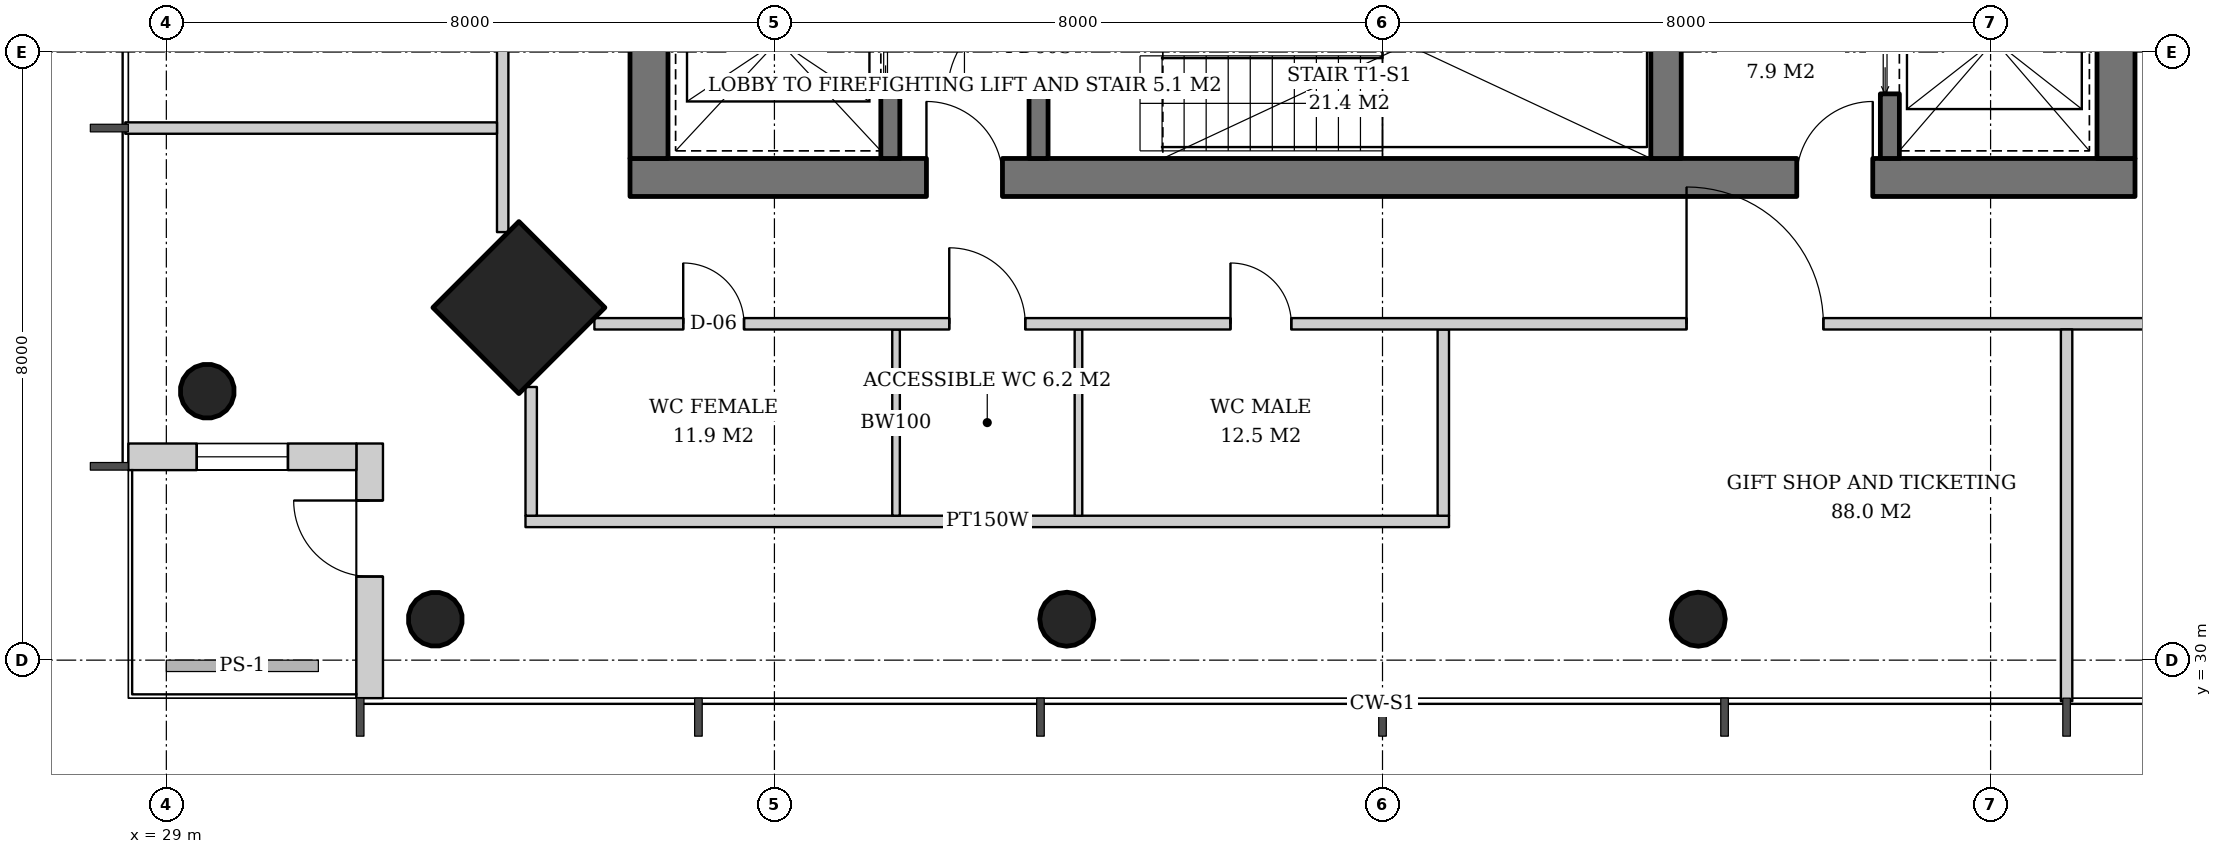
"""IFC4 building model, lengths in metres.
Left out: names, types, materials, properties, quantities, classifications, styles, units other than length and angle.
Written with IfcOpenShell. Run it as: python <this file> out.ifc"""

import sys

from ifc_helpers import new_model, si_unit, direction, frame, frame_2d, origin, origin_2d, place, context, subcontext, project, spatial, rectangle, hollow_circle, extrude, element, fill, save


model = new_model("IFC4")
c1 = context("Model", 3, precision=1e-05, world=origin(), true_north=direction((0.0, 1.0)))
c2 = subcontext(c1, "Body", "Model", "MODEL_VIEW")
j1 = project(units=[si_unit("LENGTHUNIT", "METRE"), si_unit("PLANEANGLEUNIT", "RADIAN")], contexts=[c1])
p1 = place(None, origin())
s1 = spatial("IfcSite", under=j1, at=p1, CompositionType="ELEMENT")
p2 = place(p1, origin())
s2 = spatial("IfcBuilding", under=s1, at=p2, CompositionType="ELEMENT")
p3 = place(p2, frame((0.0, 0.0, 287.0)))
s3 = spatial("IfcBuildingStorey", under=s2, at=p3, CompositionType="ELEMENT", Elevation=287.0)
p4 = place(p3, frame((33.6, 34.6, 0.0), z_axis=(0.031898107953, 0.031898107953, 0.998981992539), x_axis=(-0.707106781187, 0.707106781187, 0.0)))
e1 = element("IfcColumn", 1, at=p4, inside=s3, PredefinedType="COLUMN", context=c2, shape_type="SweptSolid", body=[
    extrude(rectangle(XDim=1.6, YDim=1.6, at=origin_2d()), origin(), (0.0, 0.0, 1.0), 3.804),
])
for number, where, z_axis, x_axis in (
    (2, (29.5, 33.5, 0.0), (0.032, 0.032, 0.999), (-0.707, 0.707, 0.0)),
    (3, (32.5, 30.5, 0.0), (0.032, 0.032, 0.999), (-0.707, 0.707, 0.0)),
):
    element("IfcColumn", number, at=place(p3, frame(where, z_axis=z_axis, x_axis=x_axis)), inside=s3, PredefinedType="COLUMN", context=c2, shape_type="SweptSolid", body=[
        extrude(hollow_circle(Radius=0.355, WallThickness=0.025, at=origin_2d()), origin(), (0.0, 0.0, 1.0), 3.804),
    ])
for number, where, z_axis, x_axis in (
    (4, (40.833, 30.5, 0.0), (0.011, 0.032, 0.999), (-0.948, 0.317, 0.0)),
    (5, (49.167, 30.5, 0.0), (-0.011, 0.032, 0.999), (-0.948, -0.317, 0.0)),
):
    element("IfcColumn", number, at=place(p3, frame(where, z_axis=z_axis, x_axis=x_axis)), inside=s3, PredefinedType="COLUMN", context=c2, shape_type="SweptSolid", body=[
        extrude(hollow_circle(Radius=0.355, WallThickness=0.025, at=origin_2d()), origin(), (0.0, 0.0, 1.0), 3.802),
    ])
p5 = place(p3, frame((35.1, 36.35, 0.0), z_axis=(0.0, 0.0, 1.0), x_axis=(1.0, 0.0, 0.0)))
e6 = element("IfcWall", 6, at=p5, inside=s3, PredefinedType="SHEAR", context=c2, shape_type="SweptSolid", body=[
    extrude(rectangle(XDim=19.8, YDim=0.5, at=frame_2d((9.9, 0.0))), origin(), (0.0, 0.0, 1.0), 3.8),
])
p6 = place(p5, frame((3.9, 0.0, 0.0)))
e7 = element("IfcOpeningElement", 7, at=p6, cuts=e6, PredefinedType="OPENING", context=c2, shape_type="SweptSolid", body=[
    extrude(rectangle(XDim=1.0, YDim=2.1, at=frame_2d((0.5, 1.05))), frame((0.0, 0.26, 0.0), z_axis=(0.0, -1.0, 0.0), x_axis=(1.0, 0.0, 0.0)), (0.0, 0.0, 1.0), 0.52),
])
p7 = place(p5, frame((15.35, 0.0, 0.0)))
e8 = element("IfcOpeningElement", 8, at=p7, cuts=e6, PredefinedType="OPENING", context=c2, shape_type="SweptSolid", body=[
    extrude(rectangle(XDim=1.0, YDim=2.1, at=frame_2d((0.5, 1.05))), frame((0.0, 0.26, 0.0), z_axis=(0.0, -1.0, 0.0), x_axis=(1.0, 0.0, 0.0)), (0.0, 0.0, 1.0), 0.52),
])
p8 = place(p3, frame((35.35, 36.6, 0.0), z_axis=(0.0, 0.0, 1.0), x_axis=(0.0, 1.0, 0.0)))
e9 = element("IfcWall", 9, at=p8, inside=s3, PredefinedType="SHEAR", context=c2, shape_type="SweptSolid", body=[
    extrude(rectangle(XDim=18.8, YDim=0.5, at=frame_2d((9.4, 0.0))), origin(), (0.0, 0.0, 1.0), 3.8),
])
p9 = place(p8, frame((8.5, 0.0, 0.0)))
e10 = element("IfcOpeningElement", 10, at=p9, cuts=e9, PredefinedType="OPENING", context=c2, shape_type="SweptSolid", body=[
    extrude(rectangle(XDim=1.8, YDim=2.4, at=frame_2d((0.9, 1.2))), frame((0.0, 0.26, 0.0), z_axis=(0.0, -1.0, 0.0), x_axis=(1.0, 0.0, 0.0)), (0.0, 0.0, 1.0), 0.52),
])
p10 = place(p3, frame((54.65, 36.6, 0.0), z_axis=(0.0, 0.0, 1.0), x_axis=(0.0, 1.0, 0.0)))
e11 = element("IfcWall", 11, at=p10, inside=s3, PredefinedType="SHEAR", context=c2, shape_type="SweptSolid", body=[
    extrude(rectangle(XDim=18.8, YDim=0.5, at=frame_2d((9.4, 0.0))), origin(), (0.0, 0.0, 1.0), 3.8),
])
p11 = place(p10, frame((8.5, 0.0, 0.0)))
e12 = element("IfcOpeningElement", 12, at=p11, cuts=e11, PredefinedType="OPENING", context=c2, shape_type="SweptSolid", body=[
    extrude(rectangle(XDim=1.8, YDim=2.4, at=frame_2d((0.9, 1.2))), frame((0.0, 0.26, 0.0), z_axis=(0.0, -1.0, 0.0), x_axis=(1.0, 0.0, 0.0)), (0.0, 0.0, 1.0), 0.52),
])
p12 = place(p3, frame((48.73, 36.6, 0.0), z_axis=(0.0, 0.0, 1.0), x_axis=(0.0, 1.0, 0.0)))
e13 = element("IfcWall", 13, at=p12, inside=s3, PredefinedType="SHEAR", context=c2, shape_type="SweptSolid", body=[
    extrude(rectangle(XDim=3.0, YDim=0.4, at=frame_2d((1.5, 0.0))), origin(), (0.0, 0.0, 1.0), 3.8),
])
p13 = place(p3, frame((31.675, 29.5, 0.0), z_axis=(0.0, 0.0, 1.0), x_axis=(0.0, 1.0, 0.0)))
e14 = element("IfcWall", 14, at=p13, inside=s3, PredefinedType="SOLIDWALL", context=c2, shape_type="SweptSolid", body=[
    extrude(rectangle(XDim=3.35, YDim=0.35, at=frame_2d((1.675, 0.0))), origin(), (0.0, 0.0, 1.0), 3.55),
])
p14 = place(p13, frame((1.6, 0.0, 0.0)))
e15 = element("IfcOpeningElement", 15, at=p14, cuts=e14, PredefinedType="OPENING", context=c2, shape_type="SweptSolid", body=[
    extrude(rectangle(XDim=1.0, YDim=2.4, at=frame_2d((0.5, 1.2))), frame((0.0, 0.185, 0.0), z_axis=(0.0, -1.0, 0.0), x_axis=(1.0, 0.0, 0.0)), (0.0, 0.0, 1.0), 0.37),
])
p15 = place(p3, frame((31.5, 32.675, 0.0), z_axis=(0.0, 0.0, 1.0), x_axis=(-1.0, 0.0, 0.0)))
e16 = element("IfcWall", 16, at=p15, inside=s3, PredefinedType="SOLIDWALL", context=c2, shape_type="SweptSolid", body=[
    extrude(rectangle(XDim=3.0, YDim=0.35, at=frame_2d((1.5, 0.0))), origin(), (0.0, 0.0, 1.0), 3.55),
])
p16 = place(p15, frame((0.9, 0.0, 0.6)))
e17 = element("IfcOpeningElement", 17, at=p16, cuts=e16, PredefinedType="OPENING", context=c2, shape_type="SweptSolid", body=[
    extrude(rectangle(XDim=1.2, YDim=2.55, at=frame_2d((0.6, 1.275))), frame((0.0, 0.185, 0.0), z_axis=(0.0, -1.0, 0.0), x_axis=(1.0, 0.0, 0.0)), (0.0, 0.0, 1.0), 0.37),
])
p17 = place(p3, frame((38.525, 36.6, 0.0), z_axis=(0.0, 0.0, 1.0), x_axis=(0.0, 1.0, 0.0)))
e18 = element("IfcWall", 18, at=p17, inside=s3, PredefinedType="SHEAR", context=c2, shape_type="SweptSolid", body=[
    extrude(rectangle(XDim=3.0, YDim=0.25, at=frame_2d((1.5, 0.0))), origin(), (0.0, 0.0, 1.0), 3.8),
])
p18 = place(p17, frame((0.9, 0.0, 0.0)))
e19 = element("IfcOpeningElement", 19, at=p18, cuts=e18, PredefinedType="OPENING", context=c2, shape_type="SweptSolid", body=[
    extrude(rectangle(XDim=1.3, YDim=2.2, at=frame_2d((0.65, 1.1))), frame((0.0, 0.135, 0.0), z_axis=(0.0, -1.0, 0.0), x_axis=(1.0, 0.0, 0.0)), (0.0, 0.0, 1.0), 0.27),
])
p19 = place(p3, frame((40.475, 36.6, 0.0), z_axis=(0.0, 0.0, 1.0), x_axis=(0.0, 1.0, 0.0)))
e20 = element("IfcWall", 20, at=p19, inside=s3, PredefinedType="SHEAR", context=c2, shape_type="SweptSolid", body=[
    extrude(rectangle(XDim=3.0, YDim=0.25, at=frame_2d((1.5, 0.0))), origin(), (0.0, 0.0, 1.0), 3.8),
])
p20 = place(p19, frame((0.85, 0.0, 0.0)))
e21 = element("IfcOpeningElement", 21, at=p20, cuts=e20, PredefinedType="OPENING", context=c2, shape_type="SweptSolid", body=[
    extrude(rectangle(XDim=1.2, YDim=2.1, at=frame_2d((0.6, 1.05))), frame((0.0, 0.135, 0.0), z_axis=(0.0, -1.0, 0.0), x_axis=(1.0, 0.0, 0.0)), (0.0, 0.0, 1.0), 0.27),
])
p21 = place(p3, frame((51.675, 36.6, 0.0), z_axis=(0.0, 0.0, 1.0), x_axis=(0.0, 1.0, 0.0)))
e22 = element("IfcWall", 22, at=p21, inside=s3, PredefinedType="SHEAR", context=c2, shape_type="SweptSolid", body=[
    extrude(rectangle(XDim=3.0, YDim=0.25, at=frame_2d((1.5, 0.0))), origin(), (0.0, 0.0, 1.0), 3.8),
])
p22 = place(p21, frame((0.85, 0.0, 0.0)))
e23 = element("IfcOpeningElement", 23, at=p22, cuts=e22, PredefinedType="OPENING", context=c2, shape_type="SweptSolid", body=[
    extrude(rectangle(XDim=1.4, YDim=2.4, at=frame_2d((0.7, 1.2))), frame((0.0, 0.135, 0.0), z_axis=(0.0, -1.0, 0.0), x_axis=(1.0, 0.0, 0.0)), (0.0, 0.0, 1.0), 0.27),
])
p23 = place(p3, frame((33.425, 56.369, 0.0), z_axis=(0.0, 0.0, 1.0), x_axis=(0.0, -1.0, 0.0)))
e24 = element("IfcWall", 24, at=p23, inside=s3, PredefinedType="PARTITIONING", context=c2, shape_type="SweptSolid", body=[
    extrude(rectangle(XDim=20.737, YDim=0.15, at=frame_2d((10.369, 0.0))), origin(), (0.0, 0.0, 1.0), 2.95),
])
p24 = place(p23, frame((8.181, 0.0, 0.0)))
e25 = element("IfcOpeningElement", 25, at=p24, cuts=e24, PredefinedType="OPENING", context=c2, shape_type="SweptSolid", body=[
    extrude(rectangle(XDim=1.8, YDim=2.4, at=frame_2d((0.9, 1.2))), frame((0.0, 0.085, 0.0), z_axis=(0.0, -1.0, 0.0), x_axis=(1.0, 0.0, 0.0)), (0.0, 0.0, 1.0), 0.17),
])
p25 = place(p3, frame((33.35, 37.0, 0.0), z_axis=(0.0, 0.0, 1.0), x_axis=(-1.0, 0.0, 0.0)))
e26 = element("IfcWall", 26, at=p25, inside=s3, PredefinedType="PARTITIONING", context=c2, shape_type="SweptSolid", body=[
    extrude(rectangle(XDim=4.89, YDim=0.15, at=frame_2d((2.445, 0.0))), origin(), (0.0, 0.0, 1.0), 3.05),
])
p26 = place(p3, frame((33.725, 31.825, 0.0), z_axis=(0.0, 0.0, 1.0), x_axis=(1.0, 0.0, 0.0)))
e27 = element("IfcWall", 27, at=p26, inside=s3, PredefinedType="PARTITIONING", context=c2, shape_type="SweptSolid", body=[
    extrude(rectangle(XDim=12.15, YDim=0.15, at=frame_2d((6.075, 0.0))), origin(), (0.0, 0.0, 1.0), 2.95),
])
p27 = place(p3, frame((33.8, 33.594, 0.0), z_axis=(0.0, 0.0, 1.0), x_axis=(0.0, -1.0, 0.0)))
e28 = element("IfcWall", 28, at=p27, inside=s3, PredefinedType="PARTITIONING", context=c2, shape_type="SweptSolid", body=[
    extrude(rectangle(XDim=1.694, YDim=0.15, at=frame_2d((0.847, 0.0))), origin(), (0.0, 0.0, 1.0), 3.55),
])
for number, where, z_axis, x_axis in (
    (29, (38.6, 34.35, 0.0), (0.0, 0.0, 1.0), (0.0, -1.0, 0.0)),
    (30, (41.0, 34.35, 0.0), (0.0, 0.0, 1.0), (0.0, -1.0, 0.0)),
):
    element("IfcWall", number, at=place(p3, frame(where, z_axis=z_axis, x_axis=x_axis)), inside=s3, PredefinedType="SOLIDWALL", context=c2, shape_type="SweptSolid", body=[
        extrude(rectangle(XDim=2.45, YDim=0.1, at=frame_2d((1.225, 0.0))), origin(), (0.0, 0.0, 1.0), 3.55),
    ])
p28 = place(p3, frame((45.8, 34.35, 0.0), z_axis=(0.0, 0.0, 1.0), x_axis=(0.0, -1.0, 0.0)))
e31 = element("IfcWall", 31, at=p28, inside=s3, PredefinedType="PARTITIONING", context=c2, shape_type="SweptSolid", body=[
    extrude(rectangle(XDim=2.45, YDim=0.15, at=frame_2d((1.225, 0.0))), origin(), (0.0, 0.0, 1.0), 3.55),
])
p29 = place(p3, frame((34.631, 34.425, 0.0), z_axis=(0.0, 0.0, 1.0), x_axis=(1.0, 0.0, 0.0)))
e32 = element("IfcWall", 32, at=p29, inside=s3, PredefinedType="PARTITIONING", context=c2, shape_type="SweptSolid", body=[
    extrude(rectangle(XDim=20.737, YDim=0.15, at=frame_2d((10.369, 0.0))), origin(), (0.0, 0.0, 1.0), 2.95),
])
p30 = place(p29, frame((1.169, 0.0, 0.0)))
e33 = element("IfcOpeningElement", 33, at=p30, cuts=e32, PredefinedType="OPENING", context=c2, shape_type="SweptSolid", body=[
    extrude(rectangle(XDim=0.8, YDim=2.1, at=frame_2d((0.4, 1.05))), frame((0.0, 0.085, 0.0), z_axis=(0.0, -1.0, 0.0), x_axis=(1.0, 0.0, 0.0)), (0.0, 0.0, 1.0), 0.17),
])
p31 = place(p29, frame((4.669, 0.0, 0.0)))
e34 = element("IfcOpeningElement", 34, at=p31, cuts=e32, PredefinedType="OPENING", context=c2, shape_type="SweptSolid", body=[
    extrude(rectangle(XDim=1.0, YDim=2.1, at=frame_2d((0.5, 1.05))), frame((0.0, 0.085, 0.0), z_axis=(0.0, -1.0, 0.0), x_axis=(1.0, 0.0, 0.0)), (0.0, 0.0, 1.0), 0.17),
])
p32 = place(p29, frame((8.369, 0.0, 0.0)))
e35 = element("IfcOpeningElement", 35, at=p32, cuts=e32, PredefinedType="OPENING", context=c2, shape_type="SweptSolid", body=[
    extrude(rectangle(XDim=0.8, YDim=2.1, at=frame_2d((0.4, 1.05))), frame((0.0, 0.085, 0.0), z_axis=(0.0, -1.0, 0.0), x_axis=(1.0, 0.0, 0.0)), (0.0, 0.0, 1.0), 0.17),
])
p33 = place(p29, frame((14.369, 0.0, 0.0)))
e36 = element("IfcOpeningElement", 36, at=p33, cuts=e32, PredefinedType="OPENING", context=c2, shape_type="SweptSolid", body=[
    extrude(rectangle(XDim=1.8, YDim=2.4, at=frame_2d((0.9, 1.2))), frame((0.0, 0.085, 0.0), z_axis=(0.0, -1.0, 0.0), x_axis=(1.0, 0.0, 0.0)), (0.0, 0.0, 1.0), 0.17),
])
p34 = place(p3, frame((54.0, 34.35, 0.0), z_axis=(0.0, 0.0, 1.0), x_axis=(0.0, -1.0, 0.0)))
e37 = element("IfcWall", 37, at=p34, inside=s3, PredefinedType="PARTITIONING", context=c2, shape_type="SweptSolid", body=[
    extrude(rectangle(XDim=4.89, YDim=0.15, at=frame_2d((2.445, 0.0))), origin(), (0.0, 0.0, 1.0), 3.05),
])
p35 = place(p14, origin())
e38 = element("IfcDoor", 38, at=p35, inside=s3, OperationType="SINGLE_SWING_RIGHT", PredefinedType="DOOR", context=c2, shape_type="SweptSolid", body=[
    extrude(rectangle(XDim=1.0, YDim=2.4, at=frame_2d((0.5, 1.2))), frame((0.0, 0.025, 0.0), z_axis=(0.0, -1.0, 0.0), x_axis=(1.0, 0.0, 0.0)), (0.0, 0.0, 1.0), 0.05),
])
fill(e15, e38)
p36 = place(p16, origin())
e39 = element("IfcWindow", 39, at=p36, inside=s3, PartitioningType="SINGLE_PANEL", PredefinedType="WINDOW", context=c2, shape_type="SweptSolid", body=[
    extrude(rectangle(XDim=1.2, YDim=2.55, at=frame_2d((0.6, 1.275))), frame((0.0, 0.03, 0.0), z_axis=(0.0, -1.0, 0.0), x_axis=(1.0, 0.0, 0.0)), (0.0, 0.0, 1.0), 0.06),
])
fill(e17, e39)
p37 = place(p18, origin())
e40 = element("IfcDoor", 40, at=p37, inside=s3, OperationType="DOUBLE_DOOR_SLIDING", PredefinedType="DOOR", context=c2, shape_type="SweptSolid", body=[
    extrude(rectangle(XDim=1.3, YDim=2.2, at=frame_2d((0.65, 1.1))), frame((0.0, 0.025, 0.0), z_axis=(0.0, -1.0, 0.0), x_axis=(1.0, 0.0, 0.0)), (0.0, 0.0, 1.0), 0.05),
])
fill(e19, e40)
p38 = place(p20, origin())
e41 = element("IfcDoor", 41, at=p38, inside=s3, OperationType="SINGLE_SWING_LEFT", PredefinedType="DOOR", context=c2, shape_type="SweptSolid", body=[
    extrude(rectangle(XDim=1.2, YDim=2.1, at=frame_2d((0.6, 1.05))), frame((0.0, 0.025, 0.0), z_axis=(0.0, -1.0, 0.0), x_axis=(1.0, 0.0, 0.0)), (0.0, 0.0, 1.0), 0.05),
])
fill(e21, e41)
p39 = place(p22, origin())
e42 = element("IfcDoor", 42, at=p39, inside=s3, OperationType="DOUBLE_DOOR_SLIDING", PredefinedType="DOOR", context=c2, shape_type="SweptSolid", body=[
    extrude(rectangle(XDim=1.4, YDim=2.4, at=frame_2d((0.7, 1.2))), frame((0.0, 0.025, 0.0), z_axis=(0.0, -1.0, 0.0), x_axis=(1.0, 0.0, 0.0)), (0.0, 0.0, 1.0), 0.05),
])
fill(e23, e42)
p40 = place(p6, origin())
e43 = element("IfcDoor", 43, at=p40, inside=s3, OperationType="SINGLE_SWING_LEFT", PredefinedType="DOOR", context=c2, shape_type="SweptSolid", body=[
    extrude(rectangle(XDim=1.0, YDim=2.1, at=frame_2d((0.5, 1.05))), frame((0.0, 0.025, 0.0), z_axis=(0.0, -1.0, 0.0), x_axis=(1.0, 0.0, 0.0)), (0.0, 0.0, 1.0), 0.05),
])
fill(e7, e43)
p41 = place(p7, origin())
e44 = element("IfcDoor", 44, at=p41, inside=s3, OperationType="SINGLE_SWING_RIGHT", PredefinedType="DOOR", context=c2, shape_type="SweptSolid", body=[
    extrude(rectangle(XDim=1.0, YDim=2.1, at=frame_2d((0.5, 1.05))), frame((0.0, 0.025, 0.0), z_axis=(0.0, -1.0, 0.0), x_axis=(1.0, 0.0, 0.0)), (0.0, 0.0, 1.0), 0.05),
])
fill(e8, e44)
p42 = place(p30, origin())
e45 = element("IfcDoor", 45, at=p42, inside=s3, OperationType="SINGLE_SWING_LEFT", PredefinedType="DOOR", context=c2, shape_type="SweptSolid", body=[
    extrude(rectangle(XDim=0.8, YDim=2.1, at=frame_2d((0.4, 1.05))), frame((0.0, 0.025, 0.0), z_axis=(0.0, -1.0, 0.0), x_axis=(1.0, 0.0, 0.0)), (0.0, 0.0, 1.0), 0.05),
])
fill(e33, e45)
p43 = place(p31, origin())
e46 = element("IfcDoor", 46, at=p43, inside=s3, OperationType="SINGLE_SWING_LEFT", PredefinedType="DOOR", context=c2, shape_type="SweptSolid", body=[
    extrude(rectangle(XDim=1.0, YDim=2.1, at=frame_2d((0.5, 1.05))), frame((0.0, 0.025, 0.0), z_axis=(0.0, -1.0, 0.0), x_axis=(1.0, 0.0, 0.0)), (0.0, 0.0, 1.0), 0.05),
])
fill(e34, e46)
p44 = place(p32, origin())
e47 = element("IfcDoor", 47, at=p44, inside=s3, OperationType="SINGLE_SWING_LEFT", PredefinedType="DOOR", context=c2, shape_type="SweptSolid", body=[
    extrude(rectangle(XDim=0.8, YDim=2.1, at=frame_2d((0.4, 1.05))), frame((0.0, 0.025, 0.0), z_axis=(0.0, -1.0, 0.0), x_axis=(1.0, 0.0, 0.0)), (0.0, 0.0, 1.0), 0.05),
])
fill(e35, e47)
p45 = place(p33, origin())
e48 = element("IfcDoor", 48, at=p45, inside=s3, OperationType="DOUBLE_DOOR_SINGLE_SWING", PredefinedType="DOOR", context=c2, shape_type="SweptSolid", body=[
    extrude(rectangle(XDim=1.8, YDim=2.4, at=frame_2d((0.9, 1.2))), frame((0.0, 0.025, 0.0), z_axis=(0.0, -1.0, 0.0), x_axis=(1.0, 0.0, 0.0)), (0.0, 0.0, 1.0), 0.05),
])
fill(e36, e48)
save(model, sys.argv[1])
